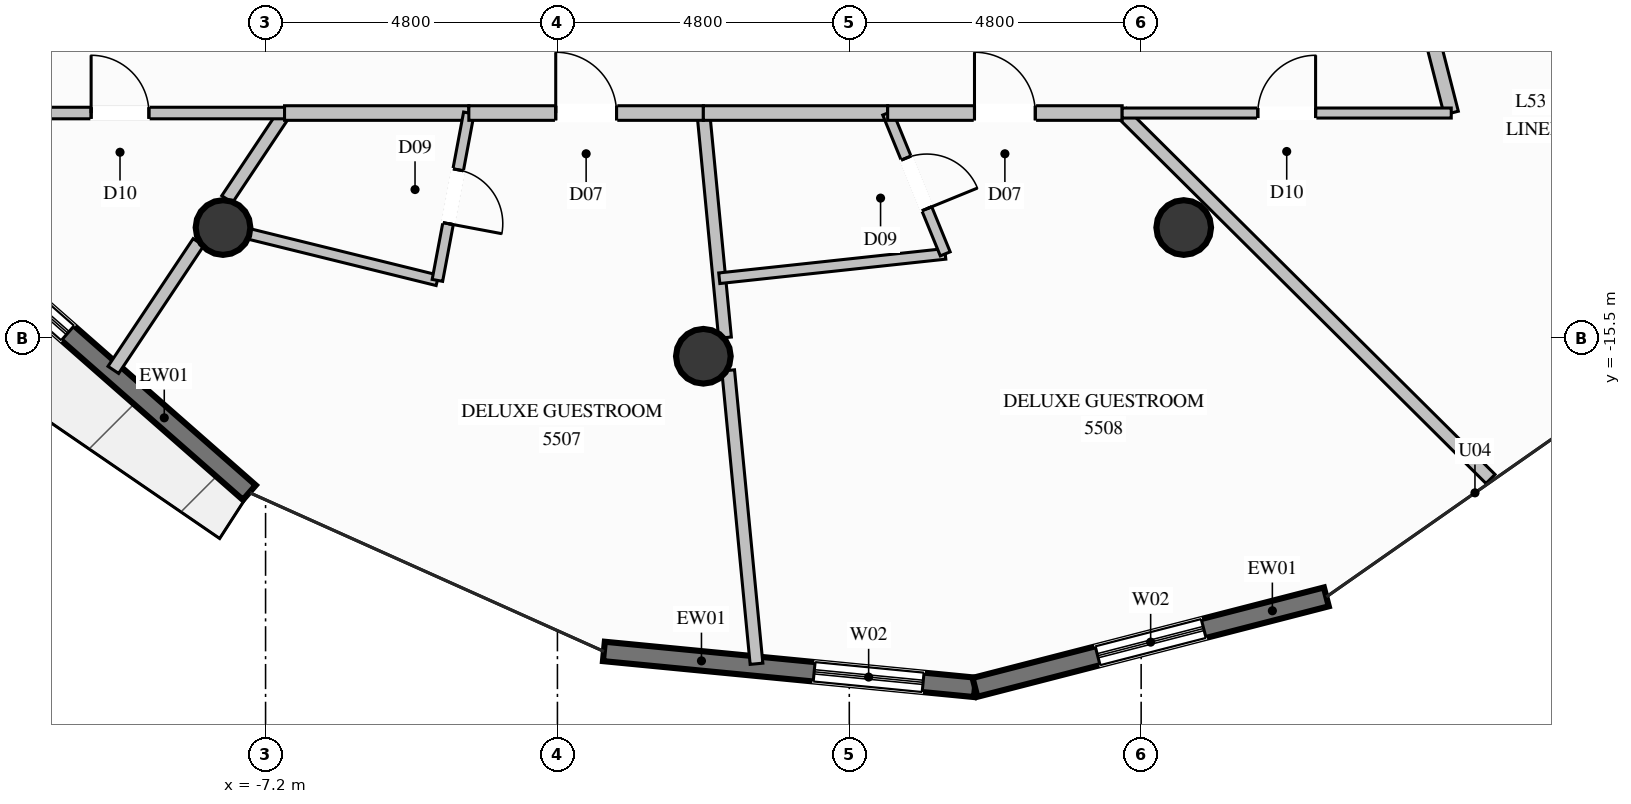
"""IFC4 building model, lengths in metres.
Left out: names, types, materials, properties, quantities, classifications, styles, units other than length and angle.
Written with IfcOpenShell. Run it as: python <this file> out.ifc"""

import sys

from ifc_helpers import new_model, si_unit, direction, frame, frame_2d, origin, origin_2d, place, context, subcontext, project, spatial, rectangle, circle, extrude, element, fill, save


model = new_model("IFC4")
c1 = context("Model", 3, precision=1e-05, world=origin(), true_north=direction((0.0, 1.0)))
c2 = subcontext(c1, "Body", "Model", "MODEL_VIEW")
j1 = project(units=[si_unit("LENGTHUNIT", "METRE"), si_unit("PLANEANGLEUNIT", "RADIAN")], contexts=[c1])
p1 = place(None, origin())
s1 = spatial("IfcSite", under=j1, at=p1, CompositionType="ELEMENT")
p2 = place(p1, origin())
s2 = spatial("IfcBuilding", under=s1, at=p2, CompositionType="ELEMENT")
p3 = place(p2, frame((0.0, 0.0, 205.6)))
s3 = spatial("IfcBuildingStorey", under=s2, at=p3, CompositionType="ELEMENT", Elevation=205.6)
for number, where, z_axis, x_axis in (
    (1, (-7.9, -13.683, 0.0), (0.0, 0.0, 1.0), (1.0, 0.0, 0.0)),
    (2, (0.0, -15.8, 0.0), (0.0, 0.0, 1.0), (1.0, 0.0, 0.0)),
    (3, (7.9, -13.683, 0.0), (0.0, 0.0, 1.0), (1.0, 0.0, 0.0)),
):
    element("IfcColumn", number, at=place(p3, frame(where, z_axis=z_axis, x_axis=x_axis)), inside=s3, PredefinedType="COLUMN", context=c2, shape_type="SweptSolid", body=[
        extrude(circle(Radius=0.45, at=origin_2d()), origin(), (0.0, 0.0, 1.0), 3.6),
    ])
p4 = place(p3, frame((-7.467, -18.041, 0.0), z_axis=(0.0, 0.0, 1.0), x_axis=(-0.751438445652, 0.659803199746, 0.0)))
e4 = element("IfcWall", 4, at=p4, inside=s3, PredefinedType="SOLIDWALL", context=c2, shape_type="SweptSolid", body=[
    extrude(rectangle(XDim=6.637, YDim=0.32, at=frame_2d((3.318, 0.0))), origin(), (0.0, 0.0, 1.0), 3.36),
])
p5 = place(p4, frame((3.974, 0.0, 0.35)))
e5 = element("IfcOpeningElement", 5, at=p5, cuts=e4, PredefinedType="OPENING", context=c2, shape_type="SweptSolid", body=[
    extrude(rectangle(XDim=1.8, YDim=2.6, at=frame_2d((0.9, 1.3))), frame((0.0, 0.17, 0.0), z_axis=(0.0, -1.0, 0.0), x_axis=(1.0, 0.0, 0.0)), (0.0, 0.0, 1.0), 0.34),
])
p6 = place(p3, frame((4.467, -21.245, 0.0), z_axis=(0.0, 0.0, 1.0), x_axis=(-0.995342991644, 0.096396727049, 0.0)))
e6 = element("IfcWall", 6, at=p6, inside=s3, PredefinedType="SOLIDWALL", context=c2, shape_type="SweptSolid", body=[
    extrude(rectangle(XDim=6.132, YDim=0.32, at=frame_2d((3.066, 0.0))), origin(), (0.0, 0.0, 1.0), 3.36),
])
p7 = place(p6, frame((0.857, 0.0, 0.35)))
e7 = element("IfcOpeningElement", 7, at=p7, cuts=e6, PredefinedType="OPENING", context=c2, shape_type="SweptSolid", body=[
    extrude(rectangle(XDim=1.8, YDim=2.6, at=frame_2d((0.9, 1.3))), frame((0.0, 0.17, 0.0), z_axis=(0.0, -1.0, 0.0), x_axis=(1.0, 0.0, 0.0)), (0.0, 0.0, 1.0), 0.34),
])
p8 = place(p3, frame((10.246, -19.757, 0.0), z_axis=(0.0, 0.0, 1.0), x_axis=(-0.968412249537, -0.249354596803, 0.0)))
e8 = element("IfcWall", 8, at=p8, inside=s3, PredefinedType="SOLIDWALL", context=c2, shape_type="SweptSolid", body=[
    extrude(rectangle(XDim=5.968, YDim=0.32, at=frame_2d((2.984, 0.0))), origin(), (0.0, 0.0, 1.0), 3.36),
])
p9 = place(p8, frame((2.084, 0.0, 0.35)))
e9 = element("IfcOpeningElement", 9, at=p9, cuts=e8, PredefinedType="OPENING", context=c2, shape_type="SweptSolid", body=[
    extrude(rectangle(XDim=1.8, YDim=2.6, at=frame_2d((0.9, 1.3))), frame((0.0, 0.17, 0.0), z_axis=(0.0, -1.0, 0.0), x_axis=(1.0, 0.0, 0.0)), (0.0, 0.0, 1.0), 0.34),
])
p10 = place(p3, frame((13.992, -8.254, 0.0), z_axis=(0.0, 0.0, 1.0), x_axis=(0.879751884647, -0.47543308831, 0.0)))
e10 = element("IfcWall", 10, at=p10, inside=s3, PredefinedType="PARTITIONING", context=c2, shape_type="SweptSolid", body=[
    extrude(rectangle(XDim=5.414, YDim=0.21, at=frame_2d((2.707, 0.0))), origin(), (0.0, 0.0, 1.0), 3.36),
])
p11 = place(p3, frame((-6.888, -11.8, 0.0), z_axis=(0.0, 0.0, 1.0), x_axis=(-0.554601004854, -0.832116413379, 0.0)))
e11 = element("IfcWall", 11, at=p11, inside=s3, PredefinedType="PARTITIONING", context=c2, shape_type="SweptSolid", body=[
    extrude(rectangle(XDim=1.704, YDim=0.21, at=frame_2d((0.852, 0.0))), origin(), (0.0, 0.0, 1.0), 2.877),
])
p12 = place(p3, frame((-8.304, -13.924, 0.0), z_axis=(0.0, 0.0, 1.0), x_axis=(-0.55476716384, -0.832005645368, 0.0)))
e12 = element("IfcWall", 12, at=p12, inside=s3, PredefinedType="PARTITIONING", context=c2, shape_type="SweptSolid", body=[
    extrude(rectangle(XDim=2.524, YDim=0.21, at=frame_2d((1.262, 0.0))), origin(), (0.0, 0.0, 1.0), 3.36),
])
p13 = place(p3, frame((-12.3, -11.8, 0.0), z_axis=(0.0, 0.0, 1.0), x_axis=(1.0, 0.0, 0.0)))
e13 = element("IfcWall", 13, at=p13, inside=s3, PredefinedType="PARTITIONING", context=c2, shape_type="SweptSolid", body=[
    extrude(rectangle(XDim=5.412, YDim=0.19, at=frame_2d((2.706, 0.0))), origin(), (0.0, 0.0, 1.0), 3.36),
])
p14 = place(p13, frame((2.231, 0.0, 0.0)))
e14 = element("IfcOpeningElement", 14, at=p14, cuts=e13, PredefinedType="OPENING", context=c2, shape_type="SweptSolid", body=[
    extrude(rectangle(XDim=0.95, YDim=2.1, at=frame_2d((0.475, 1.05))), frame((0.0, 0.105, 0.0), z_axis=(0.0, -1.0, 0.0), x_axis=(1.0, 0.0, 0.0)), (0.0, 0.0, 1.0), 0.21),
])
p15 = place(p3, frame((-6.888, -11.8, 0.0), z_axis=(0.0, 0.0, 1.0), x_axis=(1.0, 0.0, 0.0)))
e15 = element("IfcWall", 15, at=p15, inside=s3, PredefinedType="PARTITIONING", context=c2, shape_type="SweptSolid", body=[
    extrude(rectangle(XDim=3.031, YDim=0.24, at=frame_2d((1.516, 0.0))), origin(), (0.0, 0.0, 1.0), 3.36),
])
p16 = place(p3, frame((-8.108, -13.631, 0.0), z_axis=(0.0, 0.0, 1.0), x_axis=(0.97090688322, -0.23945735344, 0.0)))
e16 = element("IfcWall", 16, at=p16, inside=s3, PredefinedType="PLUMBINGWALL", context=c2, shape_type="SweptSolid", body=[
    extrude(rectangle(XDim=3.846, YDim=0.175, at=frame_2d((1.923, 0.0))), origin(), (0.0, 0.0, 1.0), 2.929),
])
p17 = place(p3, frame((-3.857, -11.8, 0.0), z_axis=(0.0, 0.0, 1.0), x_axis=(-0.184667549296, -0.982801046111, 0.0)))
e17 = element("IfcWall", 17, at=p17, inside=s3, PredefinedType="PLUMBINGWALL", context=c2, shape_type="SweptSolid", body=[
    extrude(rectangle(XDim=2.8, YDim=0.175, at=frame_2d((1.4, 0.0))), origin(), (0.0, 0.0, 1.0), 3.36),
])
p18 = place(p17, frame((0.95, 0.0, 0.0)))
e18 = element("IfcOpeningElement", 18, at=p18, cuts=e17, PredefinedType="OPENING", context=c2, shape_type="SweptSolid", body=[
    extrude(rectangle(XDim=0.9, YDim=2.1, at=frame_2d((0.45, 1.05))), frame((0.0, 0.098, 0.0), z_axis=(0.0, -1.0, 0.0), x_axis=(1.0, 0.0, 0.0)), (0.0, 0.0, 1.0), 0.195),
])
p19 = place(p3, frame((0.0, -11.8, 0.0), z_axis=(0.0, 0.0, 1.0), x_axis=(0.095920499629, -0.995388998207, 0.0)))
e19 = element("IfcWall", 19, at=p19, inside=s3, PredefinedType="PARTITIONING", context=c2, shape_type="SweptSolid", body=[
    extrude(rectangle(XDim=3.711, YDim=0.21, at=frame_2d((1.855, 0.0))), origin(), (0.0, 0.0, 1.0), 2.877),
])
p20 = place(p3, frame((0.408, -16.033, 0.0), z_axis=(0.0, 0.0, 1.0), x_axis=(0.096166420333, -0.995365269436, 0.0)))
e20 = element("IfcWall", 20, at=p20, inside=s3, PredefinedType="PARTITIONING", context=c2, shape_type="SweptSolid", body=[
    extrude(rectangle(XDim=4.846, YDim=0.21, at=frame_2d((2.423, 0.0))), origin(), (0.0, 0.0, 1.0), 3.36),
])
p21 = place(p3, frame((-3.857, -11.8, 0.0), z_axis=(0.0, 0.0, 1.0), x_axis=(1.0, 0.0, 0.0)))
e21 = element("IfcWall", 21, at=p21, inside=s3, PredefinedType="PARTITIONING", context=c2, shape_type="SweptSolid", body=[
    extrude(rectangle(XDim=3.857, YDim=0.24, at=frame_2d((1.928, 0.0))), origin(), (0.0, 0.0, 1.0), 3.36),
])
p22 = place(p21, frame((1.429, 0.0, 0.0)))
e22 = element("IfcOpeningElement", 22, at=p22, cuts=e21, PredefinedType="OPENING", context=c2, shape_type="SweptSolid", body=[
    extrude(rectangle(XDim=1.0, YDim=2.2, at=frame_2d((0.5, 1.1))), frame((0.0, 0.13, 0.0), z_axis=(0.0, -1.0, 0.0), x_axis=(1.0, 0.0, 0.0)), (0.0, 0.0, 1.0), 0.26),
])
p23 = place(p3, frame((0.0, -11.8, 0.0), z_axis=(0.0, 0.0, 1.0), x_axis=(1.0, 0.0, 0.0)))
e23 = element("IfcWall", 23, at=p23, inside=s3, PredefinedType="PARTITIONING", context=c2, shape_type="SweptSolid", body=[
    extrude(rectangle(XDim=3.031, YDim=0.24, at=frame_2d((1.516, 0.0))), origin(), (0.0, 0.0, 1.0), 3.36),
])
p24 = place(p3, frame((0.262, -14.517, 0.0), z_axis=(0.0, 0.0, 1.0), x_axis=(0.994224578558, 0.10731955736, 0.0)))
e24 = element("IfcWall", 24, at=p24, inside=s3, PredefinedType="PLUMBINGWALL", context=c2, shape_type="SweptSolid", body=[
    extrude(rectangle(XDim=3.738, YDim=0.175, at=frame_2d((1.869, 0.0))), origin(), (0.0, 0.0, 1.0), 2.929),
])
p25 = place(p3, frame((3.031, -11.8, 0.0), z_axis=(0.0, 0.0, 1.0), x_axis=(0.378496062934, -0.925602901002, 0.0)))
e25 = element("IfcWall", 25, at=p25, inside=s3, PredefinedType="PLUMBINGWALL", context=c2, shape_type="SweptSolid", body=[
    extrude(rectangle(XDim=2.502, YDim=0.175, at=frame_2d((1.251, 0.0))), origin(), (0.0, 0.0, 1.0), 3.36),
])
p26 = place(p25, frame((0.801, 0.0, 0.0)))
e26 = element("IfcOpeningElement", 26, at=p26, cuts=e25, PredefinedType="OPENING", context=c2, shape_type="SweptSolid", body=[
    extrude(rectangle(XDim=0.9, YDim=2.1, at=frame_2d((0.45, 1.05))), frame((0.0, 0.098, 0.0), z_axis=(0.0, -1.0, 0.0), x_axis=(1.0, 0.0, 0.0)), (0.0, 0.0, 1.0), 0.195),
])
p27 = place(p3, frame((6.888, -11.8, 0.0), z_axis=(0.0, 0.0, 1.0), x_axis=(0.709447324451, -0.704758464887, 0.0)))
e27 = element("IfcWall", 27, at=p27, inside=s3, PredefinedType="PARTITIONING", context=c2, shape_type="SweptSolid", body=[
    extrude(rectangle(XDim=8.539, YDim=0.21, at=frame_2d((4.27, 0.0))), origin(), (0.0, 0.0, 1.0), 3.36),
])
p28 = place(p3, frame((3.031, -11.8, 0.0), z_axis=(0.0, 0.0, 1.0), x_axis=(1.0, 0.0, 0.0)))
e28 = element("IfcWall", 28, at=p28, inside=s3, PredefinedType="PARTITIONING", context=c2, shape_type="SweptSolid", body=[
    extrude(rectangle(XDim=3.857, YDim=0.24, at=frame_2d((1.928, 0.0))), origin(), (0.0, 0.0, 1.0), 3.36),
])
p29 = place(p28, frame((1.428, 0.0, 0.0)))
e29 = element("IfcOpeningElement", 29, at=p29, cuts=e28, PredefinedType="OPENING", context=c2, shape_type="SweptSolid", body=[
    extrude(rectangle(XDim=1.0, YDim=2.2, at=frame_2d((0.5, 1.1))), frame((0.0, 0.13, 0.0), z_axis=(0.0, -1.0, 0.0), x_axis=(1.0, 0.0, 0.0)), (0.0, 0.0, 1.0), 0.26),
])
p30 = place(p3, frame((12.3, -11.8, 0.0), z_axis=(0.0, 0.0, 1.0), x_axis=(-0.247511976945, 0.968884833852, 0.0)))
e30 = element("IfcWall", 30, at=p30, inside=s3, PredefinedType="PARTITIONING", context=c2, shape_type="SweptSolid", body=[
    extrude(rectangle(XDim=5.341, YDim=0.24, at=frame_2d((2.671, 0.0))), origin(), (0.0, 0.0, 1.0), 3.36),
])
p31 = place(p3, frame((6.888, -11.8, 0.0), z_axis=(0.0, 0.0, 1.0), x_axis=(1.0, 0.0, 0.0)))
e31 = element("IfcWall", 31, at=p31, inside=s3, PredefinedType="PARTITIONING", context=c2, shape_type="SweptSolid", body=[
    extrude(rectangle(XDim=5.412, YDim=0.165, at=frame_2d((2.706, 0.0))), origin(), (0.0, 0.0, 1.0), 3.36),
])
p32 = place(p31, frame((2.231, 0.0, 0.0)))
e32 = element("IfcOpeningElement", 32, at=p32, cuts=e31, PredefinedType="OPENING", context=c2, shape_type="SweptSolid", body=[
    extrude(rectangle(XDim=0.95, YDim=2.1, at=frame_2d((0.475, 1.05))), frame((0.0, 0.093, 0.0), z_axis=(0.0, -1.0, 0.0), x_axis=(1.0, 0.0, 0.0)), (0.0, 0.0, 1.0), 0.185),
])
p33 = place(p5, origin())
e33 = element("IfcWindow", 33, at=p33, inside=s3, PartitioningType="SINGLE_PANEL", PredefinedType="WINDOW", context=c2, shape_type="SweptSolid", body=[
    extrude(rectangle(XDim=1.8, YDim=2.6, at=frame_2d((0.9, 1.3))), frame((0.0, 0.03, 0.0), z_axis=(0.0, -1.0, 0.0), x_axis=(1.0, 0.0, 0.0)), (0.0, 0.0, 1.0), 0.06),
])
fill(e5, e33)
p34 = place(p7, origin())
e34 = element("IfcWindow", 34, at=p34, inside=s3, PartitioningType="SINGLE_PANEL", PredefinedType="WINDOW", context=c2, shape_type="SweptSolid", body=[
    extrude(rectangle(XDim=1.8, YDim=2.6, at=frame_2d((0.9, 1.3))), frame((0.0, 0.03, 0.0), z_axis=(0.0, -1.0, 0.0), x_axis=(1.0, 0.0, 0.0)), (0.0, 0.0, 1.0), 0.06),
])
fill(e7, e34)
p35 = place(p9, origin())
e35 = element("IfcWindow", 35, at=p35, inside=s3, PartitioningType="SINGLE_PANEL", PredefinedType="WINDOW", context=c2, shape_type="SweptSolid", body=[
    extrude(rectangle(XDim=1.8, YDim=2.6, at=frame_2d((0.9, 1.3))), frame((0.0, 0.03, 0.0), z_axis=(0.0, -1.0, 0.0), x_axis=(1.0, 0.0, 0.0)), (0.0, 0.0, 1.0), 0.06),
])
fill(e9, e35)
p36 = place(p14, origin())
e36 = element("IfcDoor", 36, at=p36, inside=s3, OperationType="SINGLE_SWING_LEFT", PredefinedType="DOOR", context=c2, shape_type="SweptSolid", body=[
    extrude(rectangle(XDim=0.95, YDim=2.1, at=frame_2d((0.475, 1.05))), frame((0.0, 0.025, 0.0), z_axis=(0.0, -1.0, 0.0), x_axis=(1.0, 0.0, 0.0)), (0.0, 0.0, 1.0), 0.05),
])
fill(e14, e36)
p37 = place(p18, origin())
e37 = element("IfcDoor", 37, at=p37, inside=s3, OperationType="SINGLE_SWING_RIGHT", PredefinedType="DOOR", context=c2, shape_type="SweptSolid", body=[
    extrude(rectangle(XDim=0.9, YDim=2.1, at=frame_2d((0.45, 1.05))), frame((0.0, 0.025, 0.0), z_axis=(0.0, -1.0, 0.0), x_axis=(1.0, 0.0, 0.0)), (0.0, 0.0, 1.0), 0.05),
])
fill(e18, e37)
p38 = place(p22, origin())
e38 = element("IfcDoor", 38, at=p38, inside=s3, OperationType="SINGLE_SWING_LEFT", PredefinedType="DOOR", context=c2, shape_type="SweptSolid", body=[
    extrude(rectangle(XDim=1.0, YDim=2.2, at=frame_2d((0.5, 1.1))), frame((0.0, 0.025, 0.0), z_axis=(0.0, -1.0, 0.0), x_axis=(1.0, 0.0, 0.0)), (0.0, 0.0, 1.0), 0.05),
])
fill(e22, e38)
p39 = place(p26, origin())
e39 = element("IfcDoor", 39, at=p39, inside=s3, OperationType="SINGLE_SWING_RIGHT", PredefinedType="DOOR", context=c2, shape_type="SweptSolid", body=[
    extrude(rectangle(XDim=0.9, YDim=2.1, at=frame_2d((0.45, 1.05))), frame((0.0, 0.025, 0.0), z_axis=(0.0, -1.0, 0.0), x_axis=(1.0, 0.0, 0.0)), (0.0, 0.0, 1.0), 0.05),
])
fill(e26, e39)
p40 = place(p29, origin())
e40 = element("IfcDoor", 40, at=p40, inside=s3, OperationType="SINGLE_SWING_LEFT", PredefinedType="DOOR", context=c2, shape_type="SweptSolid", body=[
    extrude(rectangle(XDim=1.0, YDim=2.2, at=frame_2d((0.5, 1.1))), frame((0.0, 0.025, 0.0), z_axis=(0.0, -1.0, 0.0), x_axis=(1.0, 0.0, 0.0)), (0.0, 0.0, 1.0), 0.05),
])
fill(e29, e40)
p41 = place(p32, origin())
e41 = element("IfcDoor", 41, at=p41, inside=s3, OperationType="SINGLE_SWING_RIGHT", PredefinedType="DOOR", context=c2, shape_type="SweptSolid", body=[
    extrude(rectangle(XDim=0.95, YDim=2.1, at=frame_2d((0.475, 1.05))), frame((0.0, 0.025, 0.0), z_axis=(0.0, -1.0, 0.0), x_axis=(1.0, 0.0, 0.0)), (0.0, 0.0, 1.0), 0.05),
])
fill(e32, e41)
save(model, sys.argv[1])
